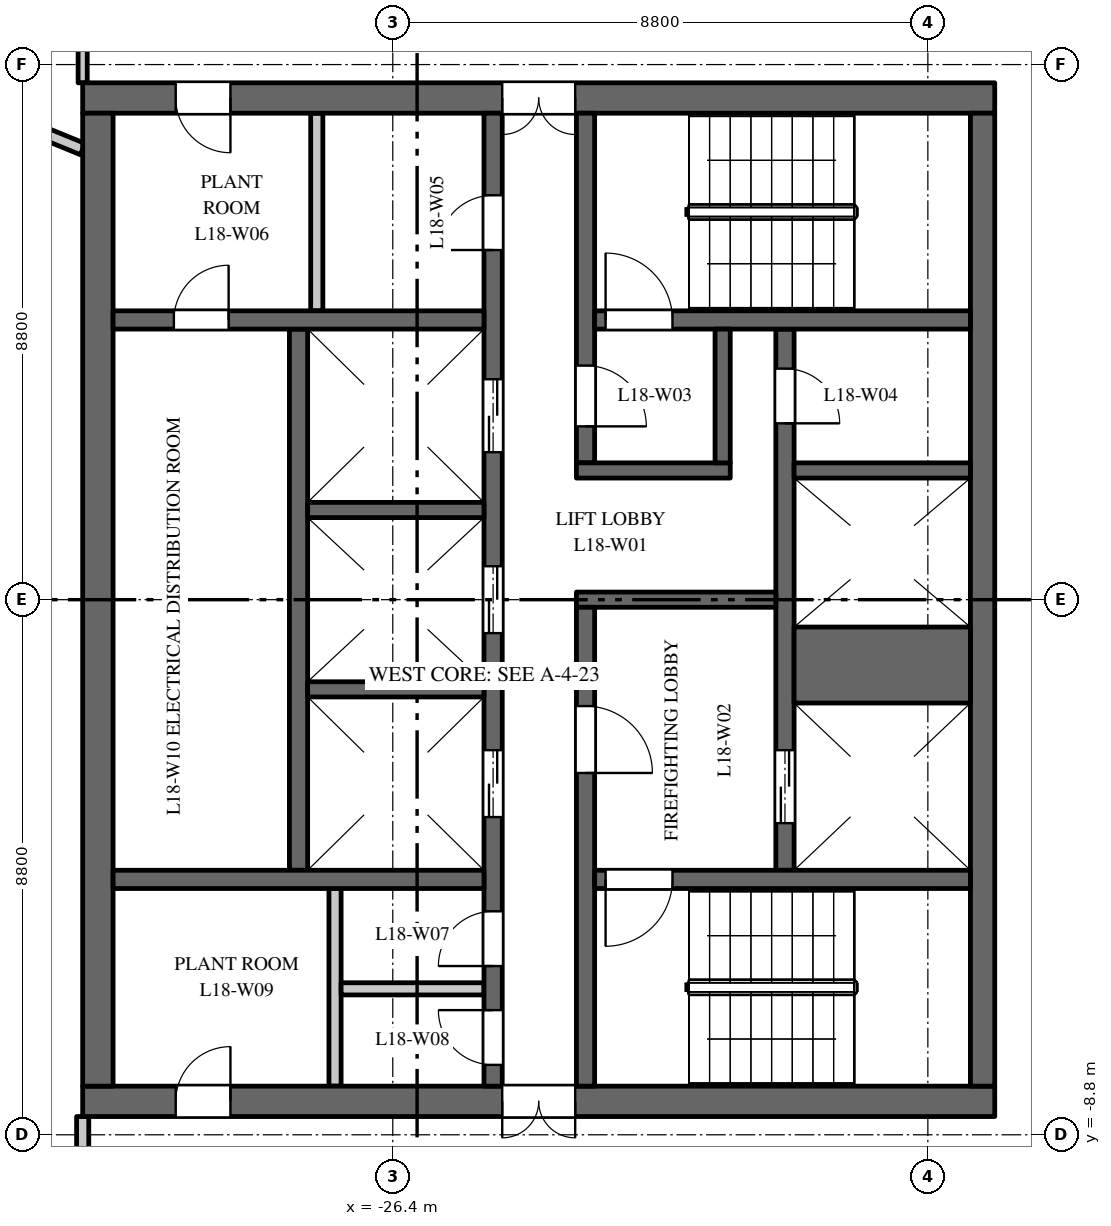
"""IFC4 building model, lengths in metres.
Left out: names, types, materials, properties, quantities, classifications, styles, units other than length and angle.
Written with IfcOpenShell. Run it as: python <this file> out.ifc"""

import sys

from ifc_helpers import new_model, si_unit, direction, frame, frame_2d, origin, place, context, subcontext, project, spatial, rectangle, extrude, element, fill, save


model = new_model("IFC4")
c1 = context("Model", 3, precision=1e-05, world=origin(), true_north=direction((0.0, 1.0)))
c2 = subcontext(c1, "Body", "Model", "MODEL_VIEW")
j1 = project(units=[si_unit("LENGTHUNIT", "METRE"), si_unit("PLANEANGLEUNIT", "RADIAN")], contexts=[c1])
p1 = place(None, origin())
s1 = spatial("IfcSite", under=j1, at=p1, CompositionType="ELEMENT")
p2 = place(p1, origin())
s2 = spatial("IfcBuilding", under=s1, at=p2, CompositionType="ELEMENT")
p3 = place(p2, frame((0.0, 0.0, 82.5)))
s3 = spatial("IfcBuildingStorey", under=s2, at=p3, CompositionType="ELEMENT", Elevation=82.5)
p4 = place(p3, frame((-16.5, 8.25, 0.0), z_axis=(0.0, 0.0, 1.0), x_axis=(-1.0, 0.0, 0.0)))
e1 = element("IfcWall", 1, at=p4, inside=s3, PredefinedType="SHEAR", context=c2, shape_type="SweptSolid", body=[
    extrude(rectangle(XDim=15.0, YDim=0.5, at=frame_2d((7.5, 0.0))), origin(), (0.0, 0.0, 1.0), 5.2),
])
p5 = place(p4, frame((6.9, 0.0, 0.0)))
e2 = element("IfcOpeningElement", 2, at=p5, cuts=e1, PredefinedType="OPENING", context=c2, shape_type="SweptSolid", body=[
    extrude(rectangle(XDim=1.2, YDim=2.1, at=frame_2d((0.6, 1.05))), frame((0.0, 0.26, 0.0), z_axis=(0.0, -1.0, 0.0), x_axis=(1.0, 0.0, 0.0)), (0.0, 0.0, 1.0), 0.52),
])
p6 = place(p4, frame((12.57, 0.0, 0.0)))
e3 = element("IfcOpeningElement", 3, at=p6, cuts=e1, PredefinedType="OPENING", context=c2, shape_type="SweptSolid", body=[
    extrude(rectangle(XDim=0.9, YDim=2.1, at=frame_2d((0.45, 1.05))), frame((0.0, 0.26, 0.0), z_axis=(0.0, -1.0, 0.0), x_axis=(1.0, 0.0, 0.0)), (0.0, 0.0, 1.0), 0.52),
])
p7 = place(p3, frame((-16.5, -8.25, 0.0), z_axis=(0.0, 0.0, 1.0), x_axis=(-1.0, 0.0, 0.0)))
e4 = element("IfcWall", 4, at=p7, inside=s3, PredefinedType="SHEAR", context=c2, shape_type="SweptSolid", body=[
    extrude(rectangle(XDim=15.0, YDim=0.5, at=frame_2d((7.5, 0.0))), origin(), (0.0, 0.0, 1.0), 5.2),
])
p8 = place(p7, frame((6.9, 0.0, 0.0)))
e5 = element("IfcOpeningElement", 5, at=p8, cuts=e4, PredefinedType="OPENING", context=c2, shape_type="SweptSolid", body=[
    extrude(rectangle(XDim=1.2, YDim=2.1, at=frame_2d((0.6, 1.05))), frame((0.0, 0.26, 0.0), z_axis=(0.0, -1.0, 0.0), x_axis=(1.0, 0.0, 0.0)), (0.0, 0.0, 1.0), 0.52),
])
p9 = place(p7, frame((12.57, 0.0, 0.0)))
e6 = element("IfcOpeningElement", 6, at=p9, cuts=e4, PredefinedType="OPENING", context=c2, shape_type="SweptSolid", body=[
    extrude(rectangle(XDim=0.9, YDim=2.1, at=frame_2d((0.45, 1.05))), frame((0.0, 0.26, 0.0), z_axis=(0.0, -1.0, 0.0), x_axis=(1.0, 0.0, 0.0)), (0.0, 0.0, 1.0), 0.52),
])
p10 = place(p3, frame((-27.95, -4.45, 0.0), z_axis=(0.0, 0.0, 1.0), x_axis=(0.0, 1.0, 0.0)))
e7 = element("IfcWall", 7, at=p10, inside=s3, PredefinedType="SHEAR", context=c2, shape_type="SweptSolid", body=[
    extrude(rectangle(XDim=8.9, YDim=0.3, at=frame_2d((4.45, 0.0))), origin(), (0.0, 0.0, 1.0), 5.2),
])
p11 = place(p3, frame((-19.95, -4.45, 0.0), z_axis=(0.0, 0.0, 1.0), x_axis=(0.0, 1.0, 0.0)))
e8 = element("IfcWall", 8, at=p11, inside=s3, PredefinedType="SHEAR", context=c2, shape_type="SweptSolid", body=[
    extrude(rectangle(XDim=8.9, YDim=0.3, at=frame_2d((4.45, 0.0))), origin(), (0.0, 0.0, 1.0), 5.2),
])
p12 = place(p11, frame((0.775, 0.0, 0.0)))
e9 = element("IfcOpeningElement", 9, at=p12, cuts=e8, PredefinedType="OPENING", context=c2, shape_type="SweptSolid", body=[
    extrude(rectangle(XDim=1.2, YDim=2.1, at=frame_2d((0.6, 1.05))), frame((0.0, 0.16, 0.0), z_axis=(0.0, -1.0, 0.0), x_axis=(1.0, 0.0, 0.0)), (0.0, 0.0, 1.0), 0.32),
])
p13 = place(p11, frame((7.35, 0.0, 0.0)))
e10 = element("IfcOpeningElement", 10, at=p13, cuts=e8, PredefinedType="OPENING", context=c2, shape_type="SweptSolid", body=[
    extrude(rectangle(XDim=0.9, YDim=2.1, at=frame_2d((0.45, 1.05))), frame((0.0, 0.16, 0.0), z_axis=(0.0, -1.0, 0.0), x_axis=(1.0, 0.0, 0.0)), (0.0, 0.0, 1.0), 0.32),
])
p14 = place(p3, frame((-24.75, -8.0, 0.0), z_axis=(0.0, 0.0, 1.0), x_axis=(0.0, 1.0, 0.0)))
e11 = element("IfcWall", 11, at=p14, inside=s3, PredefinedType="SHEAR", context=c2, shape_type="SweptSolid", body=[
    extrude(rectangle(XDim=16.0, YDim=0.3, at=frame_2d((8.0, 0.0))), origin(), (0.0, 0.0, 1.0), 5.2),
])
p15 = place(p14, frame((4.425, 0.0, 0.0)))
e12 = element("IfcOpeningElement", 12, at=p15, cuts=e11, PredefinedType="OPENING", context=c2, shape_type="SweptSolid", body=[
    extrude(rectangle(XDim=1.1, YDim=2.1, at=frame_2d((0.55, 1.05))), frame((0.0, 0.16, 0.0), z_axis=(0.0, -1.0, 0.0), x_axis=(1.0, 0.0, 0.0)), (0.0, 0.0, 1.0), 0.32),
])
p16 = place(p14, frame((7.45, 0.0, 0.0)))
e13 = element("IfcOpeningElement", 13, at=p16, cuts=e11, PredefinedType="OPENING", context=c2, shape_type="SweptSolid", body=[
    extrude(rectangle(XDim=1.1, YDim=2.1, at=frame_2d((0.55, 1.05))), frame((0.0, 0.16, 0.0), z_axis=(0.0, -1.0, 0.0), x_axis=(1.0, 0.0, 0.0)), (0.0, 0.0, 1.0), 0.32),
])
p17 = place(p14, frame((10.425, 0.0, 0.0)))
e14 = element("IfcOpeningElement", 14, at=p17, cuts=e11, PredefinedType="OPENING", context=c2, shape_type="SweptSolid", body=[
    extrude(rectangle(XDim=1.2, YDim=2.1, at=frame_2d((0.6, 1.05))), frame((0.0, 0.16, 0.0), z_axis=(0.0, -1.0, 0.0), x_axis=(1.0, 0.0, 0.0)), (0.0, 0.0, 1.0), 0.32),
])
p18 = place(p14, frame((13.75, 0.0, 0.0)))
e15 = element("IfcOpeningElement", 15, at=p18, cuts=e11, PredefinedType="OPENING", context=c2, shape_type="SweptSolid", body=[
    extrude(rectangle(XDim=0.9, YDim=2.1, at=frame_2d((0.45, 1.05))), frame((0.0, 0.16, 0.0), z_axis=(0.0, -1.0, 0.0), x_axis=(1.0, 0.0, 0.0)), (0.0, 0.0, 1.0), 0.32),
])
p19 = place(p14, frame((1.975, 0.0, 0.0)))
e16 = element("IfcOpeningElement", 16, at=p19, cuts=e11, PredefinedType="OPENING", context=c2, shape_type="SweptSolid", body=[
    extrude(rectangle(XDim=0.9, YDim=2.1, at=frame_2d((0.45, 1.05))), frame((0.0, 0.16, 0.0), z_axis=(0.0, -1.0, 0.0), x_axis=(1.0, 0.0, 0.0)), (0.0, 0.0, 1.0), 0.32),
])
p20 = place(p14, frame((0.35, 0.0, 0.0)))
e17 = element("IfcOpeningElement", 17, at=p20, cuts=e11, PredefinedType="OPENING", context=c2, shape_type="SweptSolid", body=[
    extrude(rectangle(XDim=0.9, YDim=2.1, at=frame_2d((0.45, 1.05))), frame((0.0, 0.16, 0.0), z_axis=(0.0, -1.0, 0.0), x_axis=(1.0, 0.0, 0.0)), (0.0, 0.0, 1.0), 0.32),
])
p21 = place(p3, frame((-20.1, 0.0, 0.0), z_axis=(0.0, 0.0, 1.0), x_axis=(-1.0, 0.0, 0.0)))
e18 = element("IfcWall", 18, at=p21, inside=s3, PredefinedType="SHEAR", context=c2, shape_type="SweptSolid", body=[
    extrude(rectangle(XDim=3.28, YDim=0.25, at=frame_2d((1.64, 0.0))), origin(), (0.0, 0.0, 1.0), 5.2),
])
p22 = place(p3, frame((-16.7, -8.0, 0.0), z_axis=(0.0, 0.0, 1.0), x_axis=(0.0, 1.0, 0.0)))
e19 = element("IfcWall", 19, at=p22, inside=s3, PredefinedType="SHEAR", context=c2, shape_type="SweptSolid", body=[
    extrude(rectangle(XDim=16.0, YDim=0.4, at=frame_2d((8.0, 0.0))), origin(), (0.0, 0.0, 1.0), 5.2),
])
p23 = place(p3, frame((-31.25, -8.0, 0.0), z_axis=(0.0, 0.0, 1.0), x_axis=(0.0, 1.0, 0.0)))
e20 = element("IfcWall", 20, at=p23, inside=s3, PredefinedType="SHEAR", context=c2, shape_type="SweptSolid", body=[
    extrude(rectangle(XDim=16.0, YDim=0.5, at=frame_2d((8.0, 0.0))), origin(), (0.0, 0.0, 1.0), 5.2),
])
p24 = place(p3, frame((-24.9, 4.6, 0.0), z_axis=(0.0, 0.0, 1.0), x_axis=(-1.0, 0.0, 0.0)))
e21 = element("IfcWall", 21, at=p24, inside=s3, PredefinedType="SHEAR", context=c2, shape_type="SweptSolid", body=[
    extrude(rectangle(XDim=6.1, YDim=0.3, at=frame_2d((3.05, 0.0))), origin(), (0.0, 0.0, 1.0), 5.2),
])
p25 = place(p24, frame((4.2, 0.0, 0.0)))
e22 = element("IfcOpeningElement", 22, at=p25, cuts=e21, PredefinedType="OPENING", context=c2, shape_type="SweptSolid", body=[
    extrude(rectangle(XDim=0.9, YDim=2.1, at=frame_2d((0.45, 1.05))), frame((0.0, 0.16, 0.0), z_axis=(0.0, -1.0, 0.0), x_axis=(1.0, 0.0, 0.0)), (0.0, 0.0, 1.0), 0.32),
])
for number, where, z_axis, x_axis in (
    (23, (-27.65, 4.75, 0.0), (0.0, 0.0, 1.0), (0.0, 1.0, 0.0)),
    (24, (-27.35, -8.0, 0.0), (0.0, 0.0, 1.0), (0.0, 1.0, 0.0)),
):
    element("IfcWall", number, at=place(p3, frame(where, z_axis=z_axis, x_axis=x_axis)), inside=s3, PredefinedType="PARTITIONING", context=c2, shape_type="SweptSolid", body=[
        extrude(rectangle(XDim=3.25, YDim=0.2, at=frame_2d((1.625, 0.0))), origin(), (0.0, 0.0, 1.0), 5.2),
    ])
p26 = place(p3, frame((-24.9, -6.4, 0.0), z_axis=(0.0, 0.0, 1.0), x_axis=(-1.0, 0.0, 0.0)))
e25 = element("IfcWall", 25, at=p26, inside=s3, PredefinedType="PARTITIONING", context=c2, shape_type="SweptSolid", body=[
    extrude(rectangle(XDim=2.35, YDim=0.2, at=frame_2d((1.175, 0.0))), origin(), (0.0, 0.0, 1.0), 5.2),
])
p27 = place(p3, frame((-24.9, -4.6, 0.0), z_axis=(0.0, 0.0, 1.0), x_axis=(-1.0, 0.0, 0.0)))
e26 = element("IfcWall", 26, at=p27, inside=s3, PredefinedType="SHEAR", context=c2, shape_type="SweptSolid", body=[
    extrude(rectangle(XDim=6.1, YDim=0.3, at=frame_2d((3.05, 0.0))), origin(), (0.0, 0.0, 1.0), 5.2),
])
p28 = place(p3, frame((-16.9, -1.075, 0.0), z_axis=(0.0, 0.0, 1.0), x_axis=(-1.0, 0.0, 0.0)))
e27 = element("IfcWall", 27, at=p28, inside=s3, PredefinedType="SHEAR", context=c2, shape_type="SweptSolid", body=[
    extrude(rectangle(XDim=2.9, YDim=1.25, at=frame_2d((1.45, 0.0))), origin(), (0.0, 0.0, 1.0), 5.2),
])
for number, where, z_axis, x_axis in (
    (28, (-16.9, 2.125, 0.0), (0.0, 0.0, 1.0), (-1.0, 0.0, 0.0)),
    (29, (-24.9, -1.475, 0.0), (0.0, 0.0, 1.0), (-1.0, 0.0, 0.0)),
    (30, (-24.9, 1.475, 0.0), (0.0, 0.0, 1.0), (-1.0, 0.0, 0.0)),
):
    element("IfcWall", number, at=place(p3, frame(where, z_axis=z_axis, x_axis=x_axis)), inside=s3, PredefinedType="SHEAR", context=c2, shape_type="SweptSolid", body=[
        extrude(rectangle(XDim=2.9, YDim=0.25, at=frame_2d((1.45, 0.0))), origin(), (0.0, 0.0, 1.0), 5.2),
    ])
p29 = place(p3, frame((-23.23, 2.25, 0.0), z_axis=(0.0, 0.0, 1.0), x_axis=(0.0, 1.0, 0.0)))
e31 = element("IfcWall", 31, at=p29, inside=s3, PredefinedType="SHEAR", context=c2, shape_type="SweptSolid", body=[
    extrude(rectangle(XDim=5.75, YDim=0.3, at=frame_2d((2.875, 0.0))), origin(), (0.0, 0.0, 1.0), 5.2),
])
p30 = place(p29, frame((0.6, 0.0, 0.0)))
e32 = element("IfcOpeningElement", 32, at=p30, cuts=e31, PredefinedType="OPENING", context=c2, shape_type="SweptSolid", body=[
    extrude(rectangle(XDim=1.0, YDim=2.1, at=frame_2d((0.5, 1.05))), frame((0.0, 0.16, 0.0), z_axis=(0.0, -1.0, 0.0), x_axis=(1.0, 0.0, 0.0)), (0.0, 0.0, 1.0), 0.32),
])
p31 = place(p3, frame((-23.23, -8.0, 0.0), z_axis=(0.0, 0.0, 1.0), x_axis=(0.0, 1.0, 0.0)))
e33 = element("IfcWall", 33, at=p31, inside=s3, PredefinedType="SHEAR", context=c2, shape_type="SweptSolid", body=[
    extrude(rectangle(XDim=7.875, YDim=0.3, at=frame_2d((3.938, 0.0))), origin(), (0.0, 0.0, 1.0), 5.2),
])
p32 = place(p31, frame((5.15, 0.0, 0.0)))
e34 = element("IfcOpeningElement", 34, at=p32, cuts=e33, PredefinedType="OPENING", context=c2, shape_type="SweptSolid", body=[
    extrude(rectangle(XDim=1.1, YDim=2.1, at=frame_2d((0.55, 1.05))), frame((0.0, 0.16, 0.0), z_axis=(0.0, -1.0, 0.0), x_axis=(1.0, 0.0, 0.0)), (0.0, 0.0, 1.0), 0.32),
])
p33 = place(p3, frame((-16.9, 4.6, 0.0), z_axis=(0.0, 0.0, 1.0), x_axis=(-1.0, 0.0, 0.0)))
e35 = element("IfcWall", 35, at=p33, inside=s3, PredefinedType="SHEAR", context=c2, shape_type="SweptSolid", body=[
    extrude(rectangle(XDim=6.18, YDim=0.3, at=frame_2d((3.09, 0.0))), origin(), (0.0, 0.0, 1.0), 5.2),
])
p34 = place(p33, frame((4.9, 0.0, 0.0)))
e36 = element("IfcOpeningElement", 36, at=p34, cuts=e35, PredefinedType="OPENING", context=c2, shape_type="SweptSolid", body=[
    extrude(rectangle(XDim=1.1, YDim=2.1, at=frame_2d((0.55, 1.05))), frame((0.0, 0.16, 0.0), z_axis=(0.0, -1.0, 0.0), x_axis=(1.0, 0.0, 0.0)), (0.0, 0.0, 1.0), 0.32),
])
p35 = place(p3, frame((-16.9, -4.6, 0.0), z_axis=(0.0, 0.0, 1.0), x_axis=(-1.0, 0.0, 0.0)))
e37 = element("IfcWall", 37, at=p35, inside=s3, PredefinedType="SHEAR", context=c2, shape_type="SweptSolid", body=[
    extrude(rectangle(XDim=6.18, YDim=0.3, at=frame_2d((3.09, 0.0))), origin(), (0.0, 0.0, 1.0), 5.2),
])
p36 = place(p35, frame((4.9, 0.0, 0.0)))
e38 = element("IfcOpeningElement", 38, at=p36, cuts=e37, PredefinedType="OPENING", context=c2, shape_type="SweptSolid", body=[
    extrude(rectangle(XDim=1.1, YDim=2.1, at=frame_2d((0.55, 1.05))), frame((0.0, 0.16, 0.0), z_axis=(0.0, -1.0, 0.0), x_axis=(1.0, 0.0, 0.0)), (0.0, 0.0, 1.0), 0.32),
])
p37 = place(p3, frame((-20.85, 2.125, 0.0), z_axis=(0.0, 0.0, 1.0), x_axis=(-1.0, 0.0, 0.0)))
e39 = element("IfcWall", 39, at=p37, inside=s3, PredefinedType="SHEAR", context=c2, shape_type="SweptSolid", body=[
    extrude(rectangle(XDim=2.53, YDim=0.25, at=frame_2d((1.265, 0.0))), origin(), (0.0, 0.0, 1.0), 5.2),
])
p38 = place(p3, frame((-20.975, 2.25, 0.0), z_axis=(0.0, 0.0, 1.0), x_axis=(0.0, 1.0, 0.0)))
e40 = element("IfcWall", 40, at=p38, inside=s3, PredefinedType="SHEAR", context=c2, shape_type="SweptSolid", body=[
    extrude(rectangle(XDim=2.2, YDim=0.25, at=frame_2d((1.1, 0.0))), origin(), (0.0, 0.0, 1.0), 5.2),
])
p39 = place(p3, frame((-33.398, 8.187, 0.0), z_axis=(0.0, 0.0, 1.0), x_axis=(0.925433139688, -0.378910944639, 0.0)))
e41 = element("IfcWall", 41, at=p39, inside=s3, PredefinedType="PARTITIONING", context=c2, shape_type="SweptSolid", body=[
    extrude(rectangle(XDim=2.051, YDim=0.2, at=frame_2d((1.025, 0.0))), origin(), (0.0, 0.0, 1.0), 5.2),
])
p40 = place(p3, frame((-31.5, -10.7, 0.0), z_axis=(0.0, 0.0, 1.0), x_axis=(0.0, 1.0, 0.0)))
e42 = element("IfcWall", 42, at=p40, inside=s3, PredefinedType="PARTITIONING", context=c2, shape_type="SweptSolid", body=[
    extrude(rectangle(XDim=2.2, YDim=0.2, at=frame_2d((1.1, 0.0))), origin(), (0.0, 0.0, 1.0), 5.2),
])
p41 = place(p3, frame((-31.5, 8.5, 0.0), z_axis=(0.0, 0.0, 1.0), x_axis=(0.0, 1.0, 0.0)))
e43 = element("IfcWall", 43, at=p41, inside=s3, PredefinedType="PARTITIONING", context=c2, shape_type="SweptSolid", body=[
    extrude(rectangle(XDim=2.2, YDim=0.15, at=frame_2d((1.1, 0.0))), origin(), (0.0, 0.0, 1.0), 5.2),
])
p42 = place(p12, origin())
e44 = element("IfcDoor", 44, at=p42, inside=s3, OperationType="DOUBLE_DOOR_SLIDING", PredefinedType="DOOR", context=c2, shape_type="SweptSolid", body=[
    extrude(rectangle(XDim=1.2, YDim=2.1, at=frame_2d((0.6, 1.05))), frame((0.0, 0.025, 0.0), z_axis=(0.0, -1.0, 0.0), x_axis=(1.0, 0.0, 0.0)), (0.0, 0.0, 1.0), 0.05),
])
fill(e9, e44)
p43 = place(p15, origin())
e45 = element("IfcDoor", 45, at=p43, inside=s3, OperationType="DOUBLE_DOOR_SLIDING", PredefinedType="DOOR", context=c2, shape_type="SweptSolid", body=[
    extrude(rectangle(XDim=1.1, YDim=2.1, at=frame_2d((0.55, 1.05))), frame((0.0, 0.025, 0.0), z_axis=(0.0, -1.0, 0.0), x_axis=(1.0, 0.0, 0.0)), (0.0, 0.0, 1.0), 0.05),
])
fill(e12, e45)
p44 = place(p16, origin())
e46 = element("IfcDoor", 46, at=p44, inside=s3, OperationType="DOUBLE_DOOR_SLIDING", PredefinedType="DOOR", context=c2, shape_type="SweptSolid", body=[
    extrude(rectangle(XDim=1.1, YDim=2.1, at=frame_2d((0.55, 1.05))), frame((0.0, 0.025, 0.0), z_axis=(0.0, -1.0, 0.0), x_axis=(1.0, 0.0, 0.0)), (0.0, 0.0, 1.0), 0.05),
])
fill(e13, e46)
p45 = place(p17, origin())
e47 = element("IfcDoor", 47, at=p45, inside=s3, OperationType="DOUBLE_DOOR_SLIDING", PredefinedType="DOOR", context=c2, shape_type="SweptSolid", body=[
    extrude(rectangle(XDim=1.2, YDim=2.1, at=frame_2d((0.6, 1.05))), frame((0.0, 0.025, 0.0), z_axis=(0.0, -1.0, 0.0), x_axis=(1.0, 0.0, 0.0)), (0.0, 0.0, 1.0), 0.05),
])
fill(e14, e47)
p46 = place(p34, origin())
e48 = element("IfcDoor", 48, at=p46, inside=s3, OperationType="SINGLE_SWING_RIGHT", PredefinedType="DOOR", context=c2, shape_type="SweptSolid", body=[
    extrude(rectangle(XDim=1.1, YDim=2.1, at=frame_2d((0.55, 1.05))), frame((0.0, 0.025, 0.0), z_axis=(0.0, -1.0, 0.0), x_axis=(1.0, 0.0, 0.0)), (0.0, 0.0, 1.0), 0.05),
])
fill(e36, e48)
p47 = place(p36, origin())
e49 = element("IfcDoor", 49, at=p47, inside=s3, OperationType="SINGLE_SWING_LEFT", PredefinedType="DOOR", context=c2, shape_type="SweptSolid", body=[
    extrude(rectangle(XDim=1.1, YDim=2.1, at=frame_2d((0.55, 1.05))), frame((0.0, 0.025, 0.0), z_axis=(0.0, -1.0, 0.0), x_axis=(1.0, 0.0, 0.0)), (0.0, 0.0, 1.0), 0.05),
])
fill(e38, e49)
p48 = place(p32, origin())
e50 = element("IfcDoor", 50, at=p48, inside=s3, OperationType="SINGLE_SWING_LEFT", PredefinedType="DOOR", context=c2, shape_type="SweptSolid", body=[
    extrude(rectangle(XDim=1.1, YDim=2.1, at=frame_2d((0.55, 1.05))), frame((0.0, 0.025, 0.0), z_axis=(0.0, -1.0, 0.0), x_axis=(1.0, 0.0, 0.0)), (0.0, 0.0, 1.0), 0.05),
])
fill(e34, e50)
p49 = place(p30, origin())
e51 = element("IfcDoor", 51, at=p49, inside=s3, OperationType="SINGLE_SWING_LEFT", PredefinedType="DOOR", context=c2, shape_type="SweptSolid", body=[
    extrude(rectangle(XDim=1.0, YDim=2.1, at=frame_2d((0.5, 1.05))), frame((0.0, 0.025, 0.0), z_axis=(0.0, -1.0, 0.0), x_axis=(1.0, 0.0, 0.0)), (0.0, 0.0, 1.0), 0.05),
])
fill(e32, e51)
p50 = place(p5, origin())
e52 = element("IfcDoor", 52, at=p50, inside=s3, OperationType="DOUBLE_DOOR_DOUBLE_SWING", PredefinedType="DOOR", context=c2, shape_type="SweptSolid", body=[
    extrude(rectangle(XDim=1.2, YDim=2.1, at=frame_2d((0.6, 1.05))), frame((0.0, 0.025, 0.0), z_axis=(0.0, -1.0, 0.0), x_axis=(1.0, 0.0, 0.0)), (0.0, 0.0, 1.0), 0.05),
])
fill(e2, e52)
p51 = place(p8, origin())
e53 = element("IfcDoor", 53, at=p51, inside=s3, OperationType="DOUBLE_DOOR_DOUBLE_SWING", PredefinedType="DOOR", context=c2, shape_type="SweptSolid", body=[
    extrude(rectangle(XDim=1.2, YDim=2.1, at=frame_2d((0.6, 1.05))), frame((0.0, 0.025, 0.0), z_axis=(0.0, -1.0, 0.0), x_axis=(1.0, 0.0, 0.0)), (0.0, 0.0, 1.0), 0.05),
])
fill(e5, e53)
p52 = place(p13, origin())
e54 = element("IfcDoor", 54, at=p52, inside=s3, OperationType="SINGLE_SWING_LEFT", PredefinedType="DOOR", context=c2, shape_type="SweptSolid", body=[
    extrude(rectangle(XDim=0.9, YDim=2.1, at=frame_2d((0.45, 1.05))), frame((0.0, 0.025, 0.0), z_axis=(0.0, -1.0, 0.0), x_axis=(1.0, 0.0, 0.0)), (0.0, 0.0, 1.0), 0.05),
])
fill(e10, e54)
p53 = place(p18, origin())
e55 = element("IfcDoor", 55, at=p53, inside=s3, OperationType="SINGLE_SWING_RIGHT", PredefinedType="DOOR", context=c2, shape_type="SweptSolid", body=[
    extrude(rectangle(XDim=0.9, YDim=2.1, at=frame_2d((0.45, 1.05))), frame((0.0, 0.025, 0.0), z_axis=(0.0, -1.0, 0.0), x_axis=(1.0, 0.0, 0.0)), (0.0, 0.0, 1.0), 0.05),
])
fill(e15, e55)
p54 = place(p6, origin())
e56 = element("IfcDoor", 56, at=p54, inside=s3, OperationType="SINGLE_SWING_RIGHT", PredefinedType="DOOR", context=c2, shape_type="SweptSolid", body=[
    extrude(rectangle(XDim=0.9, YDim=2.1, at=frame_2d((0.45, 1.05))), frame((0.0, 0.025, 0.0), z_axis=(0.0, -1.0, 0.0), x_axis=(1.0, 0.0, 0.0)), (0.0, 0.0, 1.0), 0.05),
])
fill(e3, e56)
p55 = place(p19, origin())
e57 = element("IfcDoor", 57, at=p55, inside=s3, OperationType="SINGLE_SWING_RIGHT", PredefinedType="DOOR", context=c2, shape_type="SweptSolid", body=[
    extrude(rectangle(XDim=0.9, YDim=2.1, at=frame_2d((0.45, 1.05))), frame((0.0, 0.025, 0.0), z_axis=(0.0, -1.0, 0.0), x_axis=(1.0, 0.0, 0.0)), (0.0, 0.0, 1.0), 0.05),
])
fill(e16, e57)
p56 = place(p20, origin())
e58 = element("IfcDoor", 58, at=p56, inside=s3, OperationType="SINGLE_SWING_LEFT", PredefinedType="DOOR", context=c2, shape_type="SweptSolid", body=[
    extrude(rectangle(XDim=0.9, YDim=2.1, at=frame_2d((0.45, 1.05))), frame((0.0, 0.025, 0.0), z_axis=(0.0, -1.0, 0.0), x_axis=(1.0, 0.0, 0.0)), (0.0, 0.0, 1.0), 0.05),
])
fill(e17, e58)
p57 = place(p9, origin())
e59 = element("IfcDoor", 59, at=p57, inside=s3, OperationType="SINGLE_SWING_LEFT", PredefinedType="DOOR", context=c2, shape_type="SweptSolid", body=[
    extrude(rectangle(XDim=0.9, YDim=2.1, at=frame_2d((0.45, 1.05))), frame((0.0, 0.025, 0.0), z_axis=(0.0, -1.0, 0.0), x_axis=(1.0, 0.0, 0.0)), (0.0, 0.0, 1.0), 0.05),
])
fill(e6, e59)
p58 = place(p25, origin())
e60 = element("IfcDoor", 60, at=p58, inside=s3, OperationType="SINGLE_SWING_LEFT", PredefinedType="DOOR", context=c2, shape_type="SweptSolid", body=[
    extrude(rectangle(XDim=0.9, YDim=2.1, at=frame_2d((0.45, 1.05))), frame((0.0, 0.025, 0.0), z_axis=(0.0, -1.0, 0.0), x_axis=(1.0, 0.0, 0.0)), (0.0, 0.0, 1.0), 0.05),
])
fill(e22, e60)
save(model, sys.argv[1])
